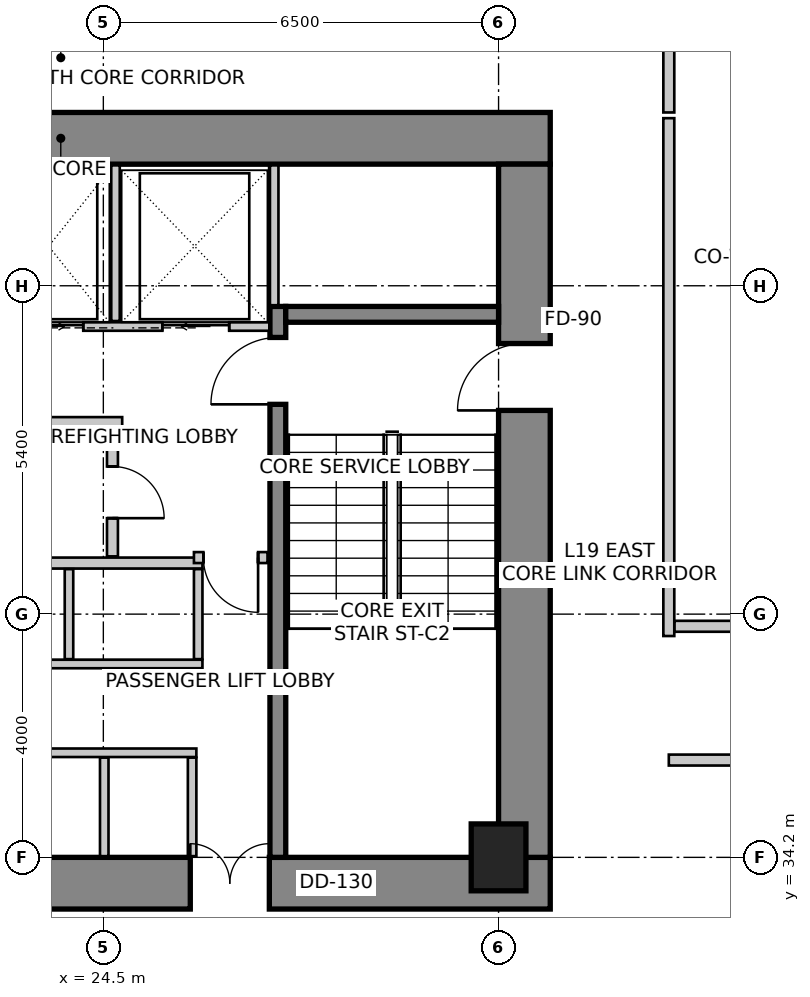
"""IFC4 building model, lengths in metres.
Left out: names, types, materials, properties, quantities, classifications, styles, units other than length and angle.
Written with IfcOpenShell. Run it as: python <this file> out.ifc"""

import sys

from ifc_helpers import new_model, si_unit, direction, frame, frame_2d, origin, origin_2d, place, context, subcontext, project, spatial, rectangle, extrude, source, transform, mapped, element, fill, save


model = new_model("IFC4")
c1 = context("Model", 3, precision=1e-05, world=origin(), true_north=direction((0.0, 1.0)))
c2 = subcontext(c1, "Body", "Model", "MODEL_VIEW")
j1 = project(units=[si_unit("LENGTHUNIT", "METRE"), si_unit("PLANEANGLEUNIT", "RADIAN")], contexts=[c1])
p1 = place(None, origin())
s1 = spatial("IfcSite", under=j1, at=p1, CompositionType="ELEMENT")
p2 = place(p1, origin())
s2 = spatial("IfcBuilding", under=s1, at=p2, CompositionType="ELEMENT")
p3 = place(p2, frame((0.0, 0.0, 79.0)))
s3 = spatial("IfcBuildingStorey", under=s2, at=p3, CompositionType="ELEMENT", Elevation=79.0)
p4 = place(p3, frame((15.75, 46.025, 0.0), z_axis=(0.0, 0.0, 1.0), x_axis=(1.0, 0.0, 0.0)))
e1 = element("IfcWall", 1, at=p4, inside=s3, PredefinedType="SHEAR", context=c2, shape_type="SweptSolid", body=[
    extrude(rectangle(XDim=16.1, YDim=0.85, at=frame_2d((8.05, 0.0))), origin(), (0.0, 0.0, 1.0), 4.0),
])
p5 = place(p3, frame((15.75, 33.775, 0.0), z_axis=(0.0, 0.0, 1.0), x_axis=(1.0, 0.0, 0.0)))
e2 = element("IfcWall", 2, at=p5, inside=s3, PredefinedType="SHEAR", context=c2, shape_type="SweptSolid", body=[
    extrude(rectangle(XDim=16.1, YDim=0.85, at=frame_2d((8.05, 0.0))), origin(), (0.0, 0.0, 1.0), 4.0),
])
m1 = source(origin(), c2, "Body", "SweptSolid", [
    extrude(rectangle(XDim=1.3, YDim=2.15, at=frame_2d((0.65, 1.075))), frame((0.0, 0.435, 0.0), z_axis=(0.0, -1.0, 0.0), x_axis=(1.0, 0.0, 0.0)), (0.0, 0.0, 1.0), 0.87),
])
p6 = place(p5, frame((10.18, 0.0, 0.0)))
e3 = element("IfcOpeningElement", 3, at=p6, cuts=e2, PredefinedType="OPENING", context=c2, shape_type="MappedRepresentation", body=[
    mapped(m1, transform((0.0, 0.0, 0.0), scale=1.0)),
])
p7 = place(p3, frame((31.425, 34.2, 0.0), z_axis=(0.0, 0.0, 1.0), x_axis=(0.0, 1.0, 0.0)))
e4 = element("IfcWall", 4, at=p7, inside=s3, PredefinedType="SHEAR", context=c2, shape_type="SweptSolid", body=[
    extrude(rectangle(XDim=11.4, YDim=0.85, at=frame_2d((5.7, 0.0))), origin(), (0.0, 0.0, 1.0), 4.0),
])
m2 = source(origin(), c2, "Body", "SweptSolid", [
    extrude(rectangle(XDim=1.1, YDim=2.15, at=frame_2d((0.55, 1.075))), frame((0.0, 0.435, 0.0), z_axis=(0.0, -1.0, 0.0), x_axis=(1.0, 0.0, 0.0)), (0.0, 0.0, 1.0), 0.87),
])
p8 = place(p7, frame((7.35, 0.0, 0.0)))
e5 = element("IfcOpeningElement", 5, at=p8, cuts=e4, PredefinedType="OPENING", context=c2, shape_type="MappedRepresentation", body=[
    mapped(m2, transform((0.0, 0.0, 0.0), scale=1.0)),
])
p9 = place(p3, frame((27.37, 34.2, 0.0), z_axis=(0.0, 0.0, 1.0), x_axis=(0.0, 1.0, 0.0)))
e6 = element("IfcWall", 6, at=p9, inside=s3, PredefinedType="SHEAR", context=c2, shape_type="SweptSolid", body=[
    extrude(rectangle(XDim=9.06, YDim=0.26, at=frame_2d((4.53, 0.0))), origin(), (0.0, 0.0, 1.0), 4.0),
])
m3 = source(origin(), c2, "Body", "SweptSolid", [
    extrude(rectangle(XDim=1.1, YDim=2.15, at=frame_2d((0.55, 1.075))), frame((0.0, 0.14, 0.0), z_axis=(0.0, -1.0, 0.0), x_axis=(1.0, 0.0, 0.0)), (0.0, 0.0, 1.0), 0.28),
])
p10 = place(p9, frame((7.45, 0.0, 0.0)))
e7 = element("IfcOpeningElement", 7, at=p10, cuts=e6, PredefinedType="OPENING", context=c2, shape_type="MappedRepresentation", body=[
    mapped(m3, transform((0.0, 0.0, 0.0), scale=1.0)),
])
p11 = place(p3, frame((27.5, 43.13, 0.0), z_axis=(0.0, 0.0, 1.0), x_axis=(1.0, 0.0, 0.0)))
e8 = element("IfcWall", 8, at=p11, inside=s3, PredefinedType="SHEAR", context=c2, shape_type="SweptSolid", body=[
    extrude(rectangle(XDim=3.5, YDim=0.26, at=frame_2d((1.75, 0.0))), origin(), (0.0, 0.0, 1.0), 4.0),
])
m4 = source(origin(), c2, "Body", "SweptSolid", [
    extrude(rectangle(XDim=0.9, YDim=1.1, at=origin_2d()), origin(), (0.0, 0.0, 1.0), 4.0),
])
p12 = place(p3, frame((31.0, 34.2, 0.0), z_axis=(0.0, 0.0, 1.0), x_axis=(1.0, 0.0, 0.0)))
e9 = element("IfcColumn", 9, at=p12, inside=s3, PredefinedType="COLUMN", context=c2, shape_type="MappedRepresentation", body=[
    mapped(m4, transform((0.0, 0.0, 0.0), scale=1.0)),
])
p13 = place(p3, frame((53.961, 47.417, 0.0), z_axis=(0.0, 0.0, 1.0), x_axis=(-0.985865713455, 0.167537443678, 0.0)))
e10 = element("IfcWall", 10, at=p13, inside=s3, PredefinedType="SOLIDWALL", context=c2, shape_type="SweptSolid", body=[
    extrude(rectangle(XDim=32.537, YDim=0.3, at=frame_2d((16.269, 0.0))), origin(), (0.0, 0.0, 1.0), 3.75),
])
m5 = source(origin(), c2, "Body", "SweptSolid", [
    extrude(rectangle(XDim=2.1, YDim=2.0, at=frame_2d((1.05, 1.0))), frame((0.0, 0.16, 0.0), z_axis=(0.0, -1.0, 0.0), x_axis=(1.0, 0.0, 0.0)), (0.0, 0.0, 1.0), 0.32),
])
p14 = place(p13, frame((0.525, 0.0, 0.85)))
e11 = element("IfcOpeningElement", 11, at=p14, cuts=e10, PredefinedType="OPENING", context=c2, shape_type="MappedRepresentation", body=[
    mapped(m5, transform((0.0, 0.0, 0.0), scale=1.0)),
])
m6 = source(origin(), c2, "Body", "SweptSolid", [
    extrude(rectangle(XDim=2.4, YDim=2.2, at=frame_2d((1.2, 1.1))), frame((0.0, 0.16, 0.0), z_axis=(0.0, -1.0, 0.0), x_axis=(1.0, 0.0, 0.0)), (0.0, 0.0, 1.0), 0.32),
])
p15 = place(p13, frame((4.022, 0.0, 0.85)))
e12 = element("IfcOpeningElement", 12, at=p15, cuts=e10, PredefinedType="OPENING", context=c2, shape_type="MappedRepresentation", body=[
    mapped(m6, transform((0.0, 0.0, 0.0), scale=1.0)),
])
p16 = place(p13, frame((8.368, 0.0, 0.85)))
e13 = element("IfcOpeningElement", 13, at=p16, cuts=e10, PredefinedType="OPENING", context=c2, shape_type="MappedRepresentation", body=[
    mapped(m6, transform((0.0, 0.0, 0.0), scale=1.0)),
])
p17 = place(p13, frame((12.713, 0.0, 0.85)))
e14 = element("IfcOpeningElement", 14, at=p17, cuts=e10, PredefinedType="OPENING", context=c2, shape_type="MappedRepresentation", body=[
    mapped(m6, transform((0.0, 0.0, 0.0), scale=1.0)),
])
p18 = place(p13, frame((18.56, 0.0, 0.85)))
e15 = element("IfcOpeningElement", 15, at=p18, cuts=e10, PredefinedType="OPENING", context=c2, shape_type="MappedRepresentation", body=[
    mapped(m6, transform((0.0, 0.0, 0.0), scale=1.0)),
])
p19 = place(p13, frame((25.095, 0.0, 0.85)))
e16 = element("IfcOpeningElement", 16, at=p19, cuts=e10, PredefinedType="OPENING", context=c2, shape_type="MappedRepresentation", body=[
    mapped(m6, transform((0.0, 0.0, 0.0), scale=1.0)),
])
p20 = place(p13, frame((29.595, 0.0, 0.85)))
e17 = element("IfcOpeningElement", 17, at=p20, cuts=e10, PredefinedType="OPENING", context=c2, shape_type="MappedRepresentation", body=[
    mapped(m6, transform((0.0, 0.0, 0.0), scale=1.0)),
])
p21 = place(p3, frame((20.37, 42.93, 0.0), z_axis=(0.0, 0.0, 1.0), x_axis=(1.0, 0.0, 0.0)))
e18 = element("IfcWall", 18, at=p21, inside=s3, PredefinedType="SOLIDWALL", context=c2, shape_type="SweptSolid", body=[
    extrude(rectangle(XDim=6.86, YDim=0.14, at=frame_2d((3.43, 0.0))), origin(), (0.0, 0.0, 1.0), 3.75),
])
m7 = source(origin(), c2, "Body", "SweptSolid", [
    extrude(rectangle(XDim=1.1, YDim=2.15, at=frame_2d((0.55, 1.075))), frame((0.0, 0.08, 0.0), z_axis=(0.0, -1.0, 0.0), x_axis=(1.0, 0.0, 0.0)), (0.0, 0.0, 1.0), 0.16),
])
p22 = place(p21, frame((0.5, 0.0, 0.0)))
e19 = element("IfcOpeningElement", 19, at=p22, cuts=e18, PredefinedType="OPENING", context=c2, shape_type="MappedRepresentation", body=[
    mapped(m7, transform((0.0, 0.0, 0.0), scale=1.0)),
])
p23 = place(p21, frame((2.7, 0.0, 0.0)))
e20 = element("IfcOpeningElement", 20, at=p23, cuts=e18, PredefinedType="OPENING", context=c2, shape_type="MappedRepresentation", body=[
    mapped(m7, transform((0.0, 0.0, 0.0), scale=1.0)),
])
p24 = place(p21, frame((5.1, 0.0, 0.0)))
e21 = element("IfcOpeningElement", 21, at=p24, cuts=e18, PredefinedType="OPENING", context=c2, shape_type="MappedRepresentation", body=[
    mapped(m7, transform((0.0, 0.0, 0.0), scale=1.0)),
])
p25 = place(p3, frame((27.31, 43.28, 0.0), z_axis=(0.0, 0.0, 1.0), x_axis=(0.0, 1.0, 0.0)))
e22 = element("IfcWall", 22, at=p25, inside=s3, PredefinedType="SOLIDWALL", context=c2, shape_type="SweptSolid", body=[
    extrude(rectangle(XDim=2.3, YDim=0.14, at=frame_2d((1.15, 0.0))), origin(), (0.0, 0.0, 1.0), 3.75),
])
p26 = place(p3, frame((24.7, 43.02, 0.0), z_axis=(0.0, 0.0, 1.0), x_axis=(0.0, 1.0, 0.0)))
e23 = element("IfcWall", 23, at=p26, inside=s3, PredefinedType="SOLIDWALL", context=c2, shape_type="SweptSolid", body=[
    extrude(rectangle(XDim=2.56, YDim=0.14, at=frame_2d((1.28, 0.0))), origin(), (0.0, 0.0, 1.0), 3.75),
])
p27 = place(p3, frame((20.38, 35.92, 0.0), z_axis=(0.0, 0.0, 1.0), x_axis=(1.0, 0.0, 0.0)))
e24 = element("IfcWall", 24, at=p27, inside=s3, PredefinedType="SOLIDWALL", context=c2, shape_type="SweptSolid", body=[
    extrude(rectangle(XDim=5.65, YDim=0.14, at=frame_2d((2.825, 0.0))), origin(), (0.0, 0.0, 1.0), 3.75),
])
m8 = source(origin(), c2, "Body", "SweptSolid", [
    extrude(rectangle(XDim=1.0, YDim=2.15, at=frame_2d((0.5, 1.075))), frame((0.0, 0.08, 0.0), z_axis=(0.0, -1.0, 0.0), x_axis=(1.0, 0.0, 0.0)), (0.0, 0.0, 1.0), 0.16),
])
p28 = place(p27, frame((0.16, 0.0, 0.0)))
e25 = element("IfcOpeningElement", 25, at=p28, cuts=e24, PredefinedType="OPENING", context=c2, shape_type="MappedRepresentation", body=[
    mapped(m8, transform((0.0, 0.0, 0.0), scale=1.0)),
])
p29 = place(p27, frame((1.55, 0.0, 0.0)))
e26 = element("IfcOpeningElement", 26, at=p29, cuts=e24, PredefinedType="OPENING", context=c2, shape_type="MappedRepresentation", body=[
    mapped(m8, transform((0.0, 0.0, 0.0), scale=1.0)),
])
for number, where, z_axis, x_axis in (
    (27, (25.96, 34.22, 0.0), (0.0, 0.0, 1.0), (0.0, 1.0, 0.0)),
    (28, (24.515, 34.22, 0.0), (0.0, 0.0, 1.0), (0.0, 1.0, 0.0)),
):
    element("IfcWall", number, at=place(p3, frame(where, z_axis=z_axis, x_axis=x_axis)), inside=s3, PredefinedType="SOLIDWALL", context=c2, shape_type="SweptSolid", body=[
        extrude(rectangle(XDim=1.62, YDim=0.14, at=frame_2d((0.81, 0.0))), origin(), (0.0, 0.0, 1.0), 3.042),
    ])
p30 = place(p3, frame((20.38, 37.38, 0.0), z_axis=(0.0, 0.0, 1.0), x_axis=(1.0, 0.0, 0.0)))
e29 = element("IfcWall", 29, at=p30, inside=s3, PredefinedType="SOLIDWALL", context=c2, shape_type="SweptSolid", body=[
    extrude(rectangle(XDim=5.75, YDim=0.14, at=frame_2d((2.875, 0.0))), origin(), (0.0, 0.0, 1.0), 3.75),
])
p31 = place(p3, frame((20.38, 39.04, 0.0), z_axis=(0.0, 0.0, 1.0), x_axis=(1.0, 0.0, 0.0)))
e30 = element("IfcWall", 30, at=p31, inside=s3, PredefinedType="SOLIDWALL", context=c2, shape_type="SweptSolid", body=[
    extrude(rectangle(XDim=5.75, YDim=0.18, at=frame_2d((2.875, 0.0))), origin(), (0.0, 0.0, 1.0), 3.75),
])
for number, where, z_axis, x_axis in (
    (31, (26.06, 37.46, 0.0), (0.0, 0.0, 1.0), (0.0, 1.0, 0.0)),
    (32, (23.935, 37.46, 0.0), (0.0, 0.0, 1.0), (0.0, 1.0, 0.0)),
):
    element("IfcWall", number, at=place(p3, frame(where, z_axis=z_axis, x_axis=x_axis)), inside=s3, PredefinedType="SOLIDWALL", context=c2, shape_type="SweptSolid", body=[
        extrude(rectangle(XDim=1.48, YDim=0.14, at=frame_2d((0.74, 0.0))), origin(), (0.0, 0.0, 1.0), 3.75),
    ])
p32 = place(p3, frame((24.81, 41.35, 0.0), z_axis=(0.0, 0.0, 1.0), x_axis=(-1.0, 0.0, 0.0)))
e33 = element("IfcWall", 33, at=p32, inside=s3, PredefinedType="PARTITIONING", context=c2, shape_type="SweptSolid", body=[
    extrude(rectangle(XDim=4.43, YDim=0.18, at=frame_2d((2.215, 0.0))), origin(), (0.0, 0.0, 1.0), 3.75),
])
p33 = place(p3, frame((24.65, 41.256, 0.0), z_axis=(0.0, 0.0, 1.0), x_axis=(0.0, -1.0, 0.0)))
e34 = element("IfcWall", 34, at=p33, inside=s3, PredefinedType="PARTITIONING", context=c2, shape_type="SweptSolid", body=[
    extrude(rectangle(XDim=2.106, YDim=0.18, at=frame_2d((1.053, 0.0))), origin(), (0.0, 0.0, 1.0), 3.75),
])
m9 = source(origin(), c2, "Body", "SweptSolid", [
    extrude(rectangle(XDim=0.85, YDim=2.15, at=frame_2d((0.425, 1.075))), frame((0.0, 0.1, 0.0), z_axis=(0.0, -1.0, 0.0), x_axis=(1.0, 0.0, 0.0)), (0.0, 0.0, 1.0), 0.2),
])
p34 = place(p33, frame((0.628, 0.0, 0.0)))
e35 = element("IfcOpeningElement", 35, at=p34, cuts=e34, PredefinedType="OPENING", context=c2, shape_type="MappedRepresentation", body=[
    mapped(m9, transform((0.0, 0.0, 0.0), scale=1.0)),
])
p35 = place(p3, frame((27.2, 39.13, 0.0), z_axis=(0.0, 0.0, 1.0), x_axis=(-1.0, 0.0, 0.0)))
e36 = element("IfcWall", 36, at=p35, inside=s3, PredefinedType="PARTITIONING", context=c2, shape_type="SweptSolid", body=[
    extrude(rectangle(XDim=1.21, YDim=0.18, at=frame_2d((0.605, 0.0))), origin(), (0.0, 0.0, 1.0), 3.75),
])
m10 = source(origin(), c2, "Body", "SweptSolid", [
    extrude(rectangle(XDim=0.9, YDim=2.15, at=frame_2d((0.45, 1.075))), frame((0.0, 0.1, 0.0), z_axis=(0.0, -1.0, 0.0), x_axis=(1.0, 0.0, 0.0)), (0.0, 0.0, 1.0), 0.2),
])
p36 = place(p35, frame((0.155, 0.0, 0.0)))
e37 = element("IfcOpeningElement", 37, at=p36, cuts=e36, PredefinedType="OPENING", context=c2, shape_type="MappedRepresentation", body=[
    mapped(m10, transform((0.0, 0.0, 0.0), scale=1.0)),
])
p37 = place(p3, frame((33.8, 48.6, 0.0), z_axis=(0.0, 0.0, 1.0), x_axis=(0.0, -1.0, 0.0)))
e38 = element("IfcWall", 38, at=p37, inside=s3, PredefinedType="PARTITIONING", context=c2, shape_type="SweptSolid", body=[
    extrude(rectangle(XDim=2.15, YDim=0.18, at=frame_2d((1.075, 0.0))), origin(), (0.0, 0.0, 1.0), 2.892),
])
p38 = place(p3, frame((33.8, 46.356, 0.0), z_axis=(0.0, 0.0, 1.0), x_axis=(0.0, -1.0, 0.0)))
e39 = element("IfcWall", 39, at=p38, inside=s3, PredefinedType="PARTITIONING", context=c2, shape_type="SweptSolid", body=[
    extrude(rectangle(XDim=8.516, YDim=0.18, at=frame_2d((4.258, 0.0))), origin(), (0.0, 0.0, 1.0), 3.279),
])
p39 = place(p3, frame((33.894, 38.0, 0.0), z_axis=(0.0, 0.0, 1.0), x_axis=(1.0, 0.0, 0.0)))
e40 = element("IfcWall", 40, at=p39, inside=s3, PredefinedType="PARTITIONING", context=c2, shape_type="SweptSolid", body=[
    extrude(rectangle(XDim=4.35, YDim=0.18, at=frame_2d((2.175, 0.0))), origin(), (0.0, 0.0, 1.0), 3.419),
])
p40 = place(p39, frame((1.725, 0.0, 0.0)))
e41 = element("IfcOpeningElement", 41, at=p40, cuts=e40, PredefinedType="OPENING", context=c2, shape_type="MappedRepresentation", body=[
    mapped(m10, transform((0.0, 0.0, 0.0), scale=1.0)),
])
p41 = place(p3, frame((50.841, 35.8, 0.0), z_axis=(0.0, 0.0, 1.0), x_axis=(-1.0, 0.0, 0.0)))
e42 = element("IfcWall", 42, at=p41, inside=s3, PredefinedType="PARTITIONING", context=c2, shape_type="SweptSolid", body=[
    extrude(rectangle(XDim=17.041, YDim=0.18, at=frame_2d((8.521, 0.0))), origin(), (0.0, 0.0, 1.0), 3.125),
])
p42 = place(p41, frame((8.01, 0.0, 0.0)))
e43 = element("IfcOpeningElement", 43, at=p42, cuts=e42, PredefinedType="OPENING", context=c2, shape_type="MappedRepresentation", body=[
    mapped(m10, transform((0.0, 0.0, 0.0), scale=1.0)),
])
m11 = source(origin(), c2, "Body", "SweptSolid", [
    extrude(rectangle(XDim=1.1, YDim=2.15, at=frame_2d((0.55, 1.075))), frame((0.0, 0.025, 0.0), z_axis=(0.0, -1.0, 0.0), x_axis=(1.0, 0.0, 0.0)), (0.0, 0.0, 1.0), 0.05),
])
p43 = place(p23, origin())
e44 = element("IfcDoor", 44, at=p43, inside=s3, OperationType="SLIDING_TO_RIGHT", PredefinedType="DOOR", context=c2, shape_type="MappedRepresentation", body=[
    mapped(m11, transform((0.0, 0.0, 0.0), scale=1.0)),
])
fill(e20, e44)
m12 = source(origin(), c2, "Body", "SweptSolid", [
    extrude(rectangle(XDim=1.1, YDim=2.15, at=frame_2d((0.55, 1.075))), frame((0.0, 0.025, 0.0), z_axis=(0.0, -1.0, 0.0), x_axis=(1.0, 0.0, 0.0)), (0.0, 0.0, 1.0), 0.05),
])
p44 = place(p24, origin())
e45 = element("IfcDoor", 45, at=p44, inside=s3, OperationType="SLIDING_TO_LEFT", PredefinedType="DOOR", context=c2, shape_type="MappedRepresentation", body=[
    mapped(m12, transform((0.0, 0.0, 0.0), scale=1.0)),
])
fill(e21, e45)
m13 = source(origin(), c2, "Body", "SweptSolid", [
    extrude(rectangle(XDim=1.1, YDim=2.15, at=frame_2d((0.55, 1.075))), frame((0.0, 0.025, 0.0), z_axis=(0.0, -1.0, 0.0), x_axis=(1.0, 0.0, 0.0)), (0.0, 0.0, 1.0), 0.05),
])
p45 = place(p10, origin())
e46 = element("IfcDoor", 46, at=p45, inside=s3, OperationType="SINGLE_SWING_LEFT", PredefinedType="DOOR", context=c2, shape_type="MappedRepresentation", body=[
    mapped(m13, transform((0.0, 0.0, 0.0), scale=1.0)),
])
fill(e7, e46)
p46 = place(p8, origin())
e47 = element("IfcDoor", 47, at=p46, inside=s3, OperationType="SINGLE_SWING_LEFT", PredefinedType="DOOR", context=c2, shape_type="MappedRepresentation", body=[
    mapped(m13, transform((0.0, 0.0, 0.0), scale=1.0)),
])
fill(e5, e47)
m14 = source(origin(), c2, "Body", "SweptSolid", [
    extrude(rectangle(XDim=1.3, YDim=2.15, at=frame_2d((0.65, 1.075))), frame((0.0, 0.025, 0.0), z_axis=(0.0, -1.0, 0.0), x_axis=(1.0, 0.0, 0.0)), (0.0, 0.0, 1.0), 0.05),
])
p47 = place(p6, origin())
e48 = element("IfcDoor", 48, at=p47, inside=s3, OperationType="DOUBLE_DOOR_SINGLE_SWING", PredefinedType="DOOR", context=c2, shape_type="MappedRepresentation", body=[
    mapped(m14, transform((0.0, 0.0, 0.0), scale=1.0)),
])
fill(e3, e48)
m15 = source(origin(), c2, "Body", "SweptSolid", [
    extrude(rectangle(XDim=0.85, YDim=2.15, at=frame_2d((0.425, 1.075))), frame((0.0, 0.025, 0.0), z_axis=(0.0, -1.0, 0.0), x_axis=(1.0, 0.0, 0.0)), (0.0, 0.0, 1.0), 0.05),
])
p48 = place(p34, origin())
e49 = element("IfcDoor", 49, at=p48, inside=s3, OperationType="SINGLE_SWING_RIGHT", PredefinedType="DOOR", context=c2, shape_type="MappedRepresentation", body=[
    mapped(m15, transform((0.0, 0.0, 0.0), scale=1.0)),
])
fill(e35, e49)
m16 = source(origin(), c2, "Body", "SweptSolid", [
    extrude(rectangle(XDim=0.9, YDim=2.15, at=frame_2d((0.45, 1.075))), frame((0.0, 0.025, 0.0), z_axis=(0.0, -1.0, 0.0), x_axis=(1.0, 0.0, 0.0)), (0.0, 0.0, 1.0), 0.05),
])
p49 = place(p36, origin())
e50 = element("IfcDoor", 50, at=p49, inside=s3, OperationType="SINGLE_SWING_LEFT", PredefinedType="DOOR", context=c2, shape_type="MappedRepresentation", body=[
    mapped(m16, transform((0.0, 0.0, 0.0), scale=1.0)),
])
fill(e37, e50)
save(model, sys.argv[1])
